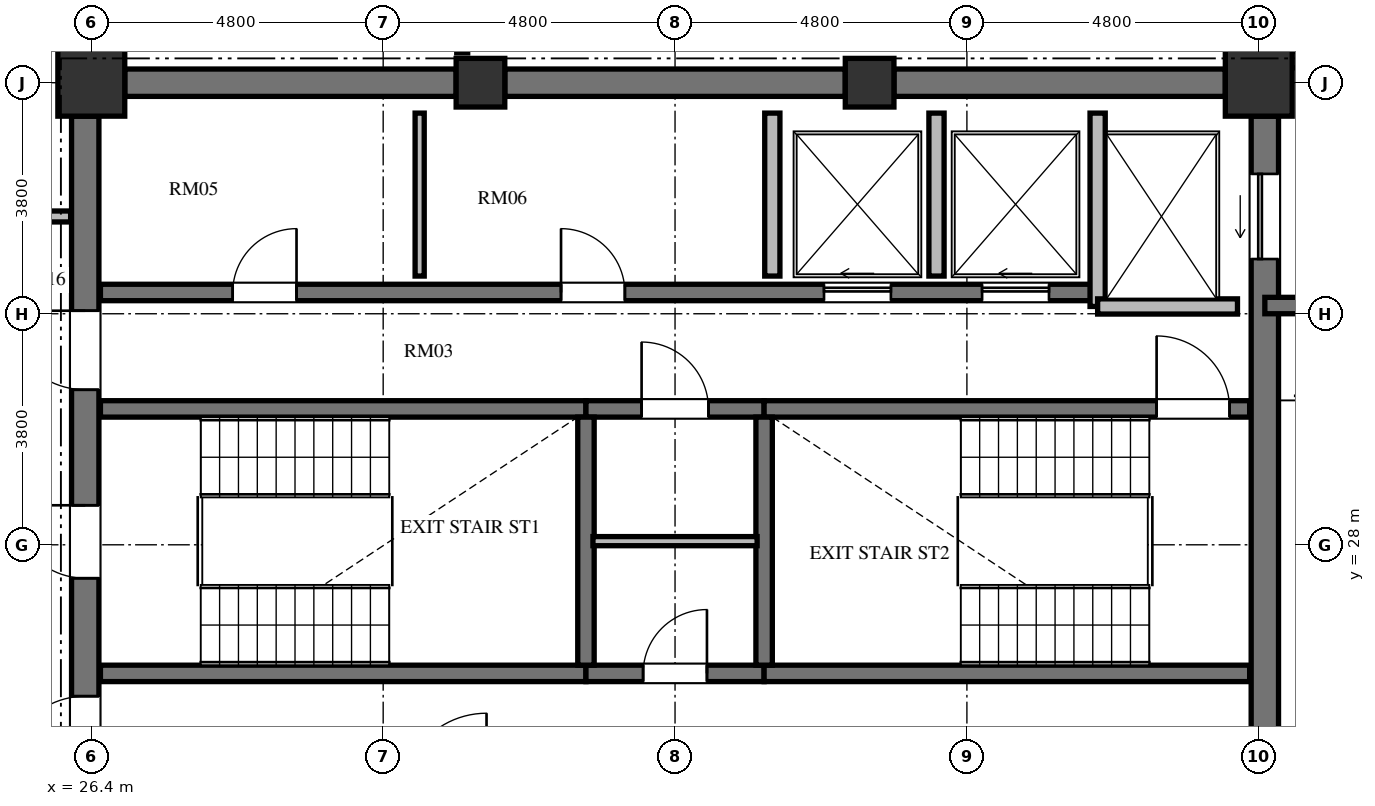
"""IFC4 building model, lengths in metres.
Left out: names, types, materials, properties, quantities, classifications, styles, units other than length and angle.
Written with IfcOpenShell. Run it as: python <this file> out.ifc"""

import sys

from ifc_helpers import new_model, si_unit, direction, frame, frame_2d, origin, origin_2d, place, context, subcontext, project, spatial, rectangle, extrude, element, fill, save


model = new_model("IFC4")
c1 = context("Model", 3, precision=1e-05, world=origin(), true_north=direction((0.0, 1.0)))
c2 = subcontext(c1, "Body", "Model", "MODEL_VIEW")
j1 = project(units=[si_unit("LENGTHUNIT", "METRE"), si_unit("PLANEANGLEUNIT", "RADIAN")], contexts=[c1])
p1 = place(None, origin())
s1 = spatial("IfcSite", under=j1, at=p1, CompositionType="ELEMENT")
p2 = place(p1, origin())
s2 = spatial("IfcBuilding", under=s1, at=p2, CompositionType="ELEMENT")
p3 = place(p2, frame((0.0, 0.0, 298.8)))
s3 = spatial("IfcBuildingStorey", under=s2, at=p3, CompositionType="ELEMENT", Elevation=298.8)
p4 = place(p3, frame((45.6, 35.6, 0.0), z_axis=(0.0, 0.0, 1.0), x_axis=(1.0, 0.0, 0.0)))
e1 = element("IfcColumn", 1, at=p4, inside=s3, PredefinedType="COLUMN", context=c2, shape_type="SweptSolid", body=[
    extrude(rectangle(XDim=1.1, YDim=1.1, at=origin_2d()), origin(), (0.0, 0.0, 1.0), 3.648),
])
for number, where, z_axis, x_axis in (
    (2, (39.2, 35.6, 0.0), (0.0, 0.0, 1.0), (1.0, 0.0, 0.0)),
    (3, (32.8, 35.6, 0.0), (0.0, 0.0, 1.0), (1.0, 0.0, 0.0)),
):
    element("IfcColumn", number, at=place(p3, frame(where, z_axis=z_axis, x_axis=x_axis)), inside=s3, PredefinedType="COLUMN", context=c2, shape_type="SweptSolid", body=[
        extrude(rectangle(XDim=0.8, YDim=0.8, at=origin_2d()), origin(), (0.0, 0.0, 1.0), 3.648),
    ])
p5 = place(p3, frame((26.4, 35.6, 0.0), z_axis=(0.0, 0.0, 1.0), x_axis=(1.0, 0.0, 0.0)))
e4 = element("IfcColumn", 4, at=p5, inside=s3, PredefinedType="COLUMN", context=c2, shape_type="SweptSolid", body=[
    extrude(rectangle(XDim=1.1, YDim=1.1, at=origin_2d()), origin(), (0.0, 0.0, 1.0), 3.648),
])
p6 = place(p3, frame((26.3, 20.95, 0.0), z_axis=(0.0, 0.0, 1.0), x_axis=(0.0, 1.0, 0.0)))
e5 = element("IfcWall", 5, at=p6, inside=s3, PredefinedType="SHEAR", context=c2, shape_type="SweptSolid", body=[
    extrude(rectangle(XDim=14.1, YDim=0.45, at=frame_2d((7.05, 0.0))), origin(), (0.0, 0.0, 1.0), 3.648),
])
p7 = place(p6, frame((6.5, 0.0, 0.0)))
e6 = element("IfcOpeningElement", 6, at=p7, cuts=e5, PredefinedType="OPENING", context=c2, shape_type="SweptSolid", body=[
    extrude(rectangle(XDim=1.2, YDim=2.15, at=frame_2d((0.6, 1.075))), frame((0.0, 0.235, 0.0), z_axis=(0.0, -1.0, 0.0), x_axis=(1.0, 0.0, 0.0)), (0.0, 0.0, 1.0), 0.47),
])
p8 = place(p6, frame((9.6, 0.0, 0.0)))
e7 = element("IfcOpeningElement", 7, at=p8, cuts=e5, PredefinedType="OPENING", context=c2, shape_type="SweptSolid", body=[
    extrude(rectangle(XDim=1.3, YDim=2.2, at=frame_2d((0.65, 1.1))), frame((0.0, 0.235, 0.0), z_axis=(0.0, -1.0, 0.0), x_axis=(1.0, 0.0, 0.0)), (0.0, 0.0, 1.0), 0.47),
])
p9 = place(p6, frame((3.26, 0.0, 0.0)))
e8 = element("IfcOpeningElement", 8, at=p9, cuts=e5, PredefinedType="OPENING", context=c2, shape_type="SweptSolid", body=[
    extrude(rectangle(XDim=1.3, YDim=2.2, at=frame_2d((0.65, 1.1))), frame((0.0, 0.235, 0.0), z_axis=(0.0, -1.0, 0.0), x_axis=(1.0, 0.0, 0.0)), (0.0, 0.0, 1.0), 0.47),
])
p10 = place(p3, frame((45.7, 20.95, 0.0), z_axis=(0.0, 0.0, 1.0), x_axis=(0.0, 1.0, 0.0)))
e9 = element("IfcWall", 9, at=p10, inside=s3, PredefinedType="SHEAR", context=c2, shape_type="SweptSolid", body=[
    extrude(rectangle(XDim=14.1, YDim=0.45, at=frame_2d((7.05, 0.0))), origin(), (0.0, 0.0, 1.0), 3.648),
])
p11 = place(p10, frame((11.75, 0.0, 0.0)))
e10 = element("IfcOpeningElement", 10, at=p11, cuts=e9, PredefinedType="OPENING", context=c2, shape_type="SweptSolid", body=[
    extrude(rectangle(XDim=1.4, YDim=2.3, at=frame_2d((0.7, 1.15))), frame((0.0, 0.235, 0.0), z_axis=(0.0, -1.0, 0.0), x_axis=(1.0, 0.0, 0.0)), (0.0, 0.0, 1.0), 0.47),
])
p12 = place(p10, frame((0.95, 0.0, 0.0)))
e11 = element("IfcOpeningElement", 11, at=p12, cuts=e9, PredefinedType="OPENING", context=c2, shape_type="SweptSolid", body=[
    extrude(rectangle(XDim=1.4, YDim=2.3, at=frame_2d((0.7, 1.15))), frame((0.0, 0.235, 0.0), z_axis=(0.0, -1.0, 0.0), x_axis=(1.0, 0.0, 0.0)), (0.0, 0.0, 1.0), 0.47),
])
p13 = place(p3, frame((26.95, 35.6, 0.0), z_axis=(0.0, 0.0, 1.0), x_axis=(1.0, 0.0, 0.0)))
e12 = element("IfcWall", 12, at=p13, inside=s3, PredefinedType="SHEAR", context=c2, shape_type="SweptSolid", body=[
    extrude(rectangle(XDim=5.45, YDim=0.45, at=frame_2d((2.725, 0.0))), origin(), (0.0, 0.0, 1.0), 3.648),
])
p14 = place(p3, frame((33.2, 35.6, 0.0), z_axis=(0.0, 0.0, 1.0), x_axis=(1.0, 0.0, 0.0)))
e13 = element("IfcWall", 13, at=p14, inside=s3, PredefinedType="SHEAR", context=c2, shape_type="SweptSolid", body=[
    extrude(rectangle(XDim=5.6, YDim=0.45, at=frame_2d((2.8, 0.0))), origin(), (0.0, 0.0, 1.0), 3.648),
])
p15 = place(p3, frame((39.6, 35.6, 0.0), z_axis=(0.0, 0.0, 1.0), x_axis=(1.0, 0.0, 0.0)))
e14 = element("IfcWall", 14, at=p15, inside=s3, PredefinedType="SHEAR", context=c2, shape_type="SweptSolid", body=[
    extrude(rectangle(XDim=5.45, YDim=0.45, at=frame_2d((2.725, 0.0))), origin(), (0.0, 0.0, 1.0), 3.648),
])
p16 = place(p3, frame((27.595, 38.808, 0.0), z_axis=(0.0, 0.0, 1.0), x_axis=(-0.728251519923, -0.685309947199, 0.0)))
e15 = element("IfcWall", 15, at=p16, inside=s3, PredefinedType="SOLIDWALL", context=c2, shape_type="SweptSolid", body=[
    extrude(rectangle(XDim=5.981, YDim=0.28, at=frame_2d((2.99, 0.0))), origin(), (0.0, 0.0, 1.0), 3.328),
])
p17 = place(p16, frame((2.391, 0.0, 0.85)))
e16 = element("IfcOpeningElement", 16, at=p17, cuts=e15, PredefinedType="OPENING", context=c2, shape_type="SweptSolid", body=[
    extrude(rectangle(XDim=1.2, YDim=1.8, at=frame_2d((0.6, 0.9))), frame((0.0, 0.15, 0.0), z_axis=(0.0, -1.0, 0.0), x_axis=(1.0, 0.0, 0.0)), (0.0, 0.0, 1.0), 0.3),
])
p18 = place(p3, frame((26.55, 30.235, 0.0), z_axis=(0.0, 0.0, 1.0), x_axis=(1.0, 0.0, 0.0)))
e17 = element("IfcWall", 17, at=p18, inside=s3, PredefinedType="SHEAR", context=c2, shape_type="SweptSolid", body=[
    extrude(rectangle(XDim=7.985, YDim=0.27, at=frame_2d((3.992, 0.0))), origin(), (0.0, 0.0, 1.0), 3.648),
])
p19 = place(p3, frame((34.535, 30.235, 0.0), z_axis=(0.0, 0.0, 1.0), x_axis=(1.0, 0.0, 0.0)))
e18 = element("IfcWall", 18, at=p19, inside=s3, PredefinedType="SHEAR", context=c2, shape_type="SweptSolid", body=[
    extrude(rectangle(XDim=2.93, YDim=0.27, at=frame_2d((1.465, 0.0))), origin(), (0.0, 0.0, 1.0), 3.648),
])
p20 = place(p19, frame((0.915, 0.0, 0.0)))
e19 = element("IfcOpeningElement", 19, at=p20, cuts=e18, PredefinedType="OPENING", context=c2, shape_type="SweptSolid", body=[
    extrude(rectangle(XDim=1.1, YDim=2.15, at=frame_2d((0.55, 1.075))), frame((0.0, 0.145, 0.0), z_axis=(0.0, -1.0, 0.0), x_axis=(1.0, 0.0, 0.0)), (0.0, 0.0, 1.0), 0.29),
])
p21 = place(p3, frame((37.465, 30.235, 0.0), z_axis=(0.0, 0.0, 1.0), x_axis=(1.0, 0.0, 0.0)))
e20 = element("IfcWall", 20, at=p21, inside=s3, PredefinedType="SHEAR", context=c2, shape_type="SweptSolid", body=[
    extrude(rectangle(XDim=7.985, YDim=0.27, at=frame_2d((3.992, 0.0))), origin(), (0.0, 0.0, 1.0), 3.648),
])
p22 = place(p21, frame((6.455, 0.0, 0.0)))
e21 = element("IfcOpeningElement", 21, at=p22, cuts=e20, PredefinedType="OPENING", context=c2, shape_type="SweptSolid", body=[
    extrude(rectangle(XDim=1.2, YDim=2.15, at=frame_2d((0.6, 1.075))), frame((0.0, 0.145, 0.0), z_axis=(0.0, -1.0, 0.0), x_axis=(1.0, 0.0, 0.0)), (0.0, 0.0, 1.0), 0.29),
])
p23 = place(p3, frame((26.55, 25.885, 0.0), z_axis=(0.0, 0.0, 1.0), x_axis=(1.0, 0.0, 0.0)))
e22 = element("IfcWall", 22, at=p23, inside=s3, PredefinedType="SHEAR", context=c2, shape_type="SweptSolid", body=[
    extrude(rectangle(XDim=7.985, YDim=0.27, at=frame_2d((3.992, 0.0))), origin(), (0.0, 0.0, 1.0), 3.648),
])
p24 = place(p3, frame((34.535, 25.885, 0.0), z_axis=(0.0, 0.0, 1.0), x_axis=(1.0, 0.0, 0.0)))
e23 = element("IfcWall", 23, at=p24, inside=s3, PredefinedType="SHEAR", context=c2, shape_type="SweptSolid", body=[
    extrude(rectangle(XDim=2.93, YDim=0.27, at=frame_2d((1.465, 0.0))), origin(), (0.0, 0.0, 1.0), 3.648),
])
p25 = place(p24, frame((0.94, 0.0, 0.0)))
e24 = element("IfcOpeningElement", 24, at=p25, cuts=e23, PredefinedType="OPENING", context=c2, shape_type="SweptSolid", body=[
    extrude(rectangle(XDim=1.05, YDim=2.15, at=frame_2d((0.525, 1.075))), frame((0.0, 0.145, 0.0), z_axis=(0.0, -1.0, 0.0), x_axis=(1.0, 0.0, 0.0)), (0.0, 0.0, 1.0), 0.29),
])
p26 = place(p3, frame((37.465, 25.885, 0.0), z_axis=(0.0, 0.0, 1.0), x_axis=(1.0, 0.0, 0.0)))
e25 = element("IfcWall", 25, at=p26, inside=s3, PredefinedType="SHEAR", context=c2, shape_type="SweptSolid", body=[
    extrude(rectangle(XDim=7.985, YDim=0.27, at=frame_2d((3.992, 0.0))), origin(), (0.0, 0.0, 1.0), 3.648),
])
for number, where, z_axis, x_axis in (
    (26, (34.535, 26.02, 0.0), (0.0, 0.0, 1.0), (0.0, 1.0, 0.0)),
    (27, (37.465, 26.02, 0.0), (0.0, 0.0, 1.0), (0.0, 1.0, 0.0)),
):
    element("IfcWall", number, at=place(p3, frame(where, z_axis=z_axis, x_axis=x_axis)), inside=s3, PredefinedType="SHEAR", context=c2, shape_type="SweptSolid", body=[
        extrude(rectangle(XDim=4.08, YDim=0.27, at=frame_2d((2.04, 0.0))), origin(), (0.0, 0.0, 1.0), 3.648),
    ])
p27 = place(p3, frame((34.65, 28.06, 0.0), z_axis=(0.0, 0.0, 1.0), x_axis=(1.0, 0.0, 0.0)))
e28 = element("IfcWall", 28, at=p27, inside=s3, PredefinedType="PARTITIONING", context=c2, shape_type="SweptSolid", body=[
    extrude(rectangle(XDim=2.7, YDim=0.15, at=frame_2d((1.35, 0.0))), origin(), (0.0, 0.0, 1.0), 3.328),
])
p28 = place(p3, frame((26.55, 32.15, 0.0), z_axis=(0.0, 0.0, 1.0), x_axis=(1.0, 0.0, 0.0)))
e29 = element("IfcWall", 29, at=p28, inside=s3, PredefinedType="SHEAR", context=c2, shape_type="SweptSolid", body=[
    extrude(rectangle(XDim=16.4, YDim=0.27, at=frame_2d((8.2, 0.0))), origin(), (0.0, 0.0, 1.0), 3.648),
])
p29 = place(p28, frame((2.175, 0.0, 0.0)))
e30 = element("IfcOpeningElement", 30, at=p29, cuts=e29, PredefinedType="OPENING", context=c2, shape_type="SweptSolid", body=[
    extrude(rectangle(XDim=1.05, YDim=2.15, at=frame_2d((0.525, 1.075))), frame((0.0, 0.145, 0.0), z_axis=(0.0, -1.0, 0.0), x_axis=(1.0, 0.0, 0.0)), (0.0, 0.0, 1.0), 0.29),
])
p30 = place(p28, frame((7.575, 0.0, 0.0)))
e31 = element("IfcOpeningElement", 31, at=p30, cuts=e29, PredefinedType="OPENING", context=c2, shape_type="SweptSolid", body=[
    extrude(rectangle(XDim=1.05, YDim=2.15, at=frame_2d((0.525, 1.075))), frame((0.0, 0.145, 0.0), z_axis=(0.0, -1.0, 0.0), x_axis=(1.0, 0.0, 0.0)), (0.0, 0.0, 1.0), 0.29),
])
p31 = place(p28, frame((11.9, 0.0, 0.0)))
e32 = element("IfcOpeningElement", 32, at=p31, cuts=e29, PredefinedType="OPENING", context=c2, shape_type="SweptSolid", body=[
    extrude(rectangle(XDim=1.1, YDim=2.2, at=frame_2d((0.55, 1.1))), frame((0.0, 0.145, 0.0), z_axis=(0.0, -1.0, 0.0), x_axis=(1.0, 0.0, 0.0)), (0.0, 0.0, 1.0), 0.29),
])
p32 = place(p28, frame((14.5, 0.0, 0.0)))
e33 = element("IfcOpeningElement", 33, at=p32, cuts=e29, PredefinedType="OPENING", context=c2, shape_type="SweptSolid", body=[
    extrude(rectangle(XDim=1.1, YDim=2.2, at=frame_2d((0.55, 1.1))), frame((0.0, 0.145, 0.0), z_axis=(0.0, -1.0, 0.0), x_axis=(1.0, 0.0, 0.0)), (0.0, 0.0, 1.0), 0.29),
])
p33 = place(p3, frame((42.95, 31.92, 0.0), z_axis=(0.0, 0.0, 1.0), x_axis=(0.0, 1.0, 0.0)))
e34 = element("IfcWall", 34, at=p33, inside=s3, PredefinedType="SOLIDWALL", context=c2, shape_type="SweptSolid", body=[
    extrude(rectangle(XDim=3.18, YDim=0.25, at=frame_2d((1.59, 0.0))), origin(), (0.0, 0.0, 1.0), 3.328),
])
p34 = place(p3, frame((42.95, 31.92, 0.0), z_axis=(0.0, 0.0, 1.0), x_axis=(1.0, 0.0, 0.0)))
e35 = element("IfcWall", 35, at=p34, inside=s3, PredefinedType="SOLIDWALL", context=c2, shape_type="SweptSolid", body=[
    extrude(rectangle(XDim=2.3, YDim=0.25, at=frame_2d((1.15, 0.0))), origin(), (0.0, 0.0, 1.0), 3.328),
])
for number, where, z_axis, x_axis in (
    (36, (37.6, 32.42, 0.0), (0.0, 0.0, 1.0), (0.0, 1.0, 0.0)),
    (37, (40.3, 32.42, 0.0), (0.0, 0.0, 1.0), (0.0, 1.0, 0.0)),
):
    element("IfcWall", number, at=place(p3, frame(where, z_axis=z_axis, x_axis=x_axis)), inside=s3, PredefinedType="SOLIDWALL", context=c2, shape_type="SweptSolid", body=[
        extrude(rectangle(XDim=2.68, YDim=0.25, at=frame_2d((1.34, 0.0))), origin(), (0.0, 0.0, 1.0), 3.328),
    ])
p35 = place(p3, frame((31.8, 32.42, 0.0), z_axis=(0.0, 0.0, 1.0), x_axis=(0.0, 1.0, 0.0)))
e38 = element("IfcWall", 38, at=p35, inside=s3, PredefinedType="PARTITIONING", context=c2, shape_type="SweptSolid", body=[
    extrude(rectangle(XDim=2.68, YDim=0.15, at=frame_2d((1.34, 0.0))), origin(), (0.0, 0.0, 1.0), 3.328),
])
p36 = place(p3, frame((45.925, 35.98, 0.0), z_axis=(0.0, 0.0, 1.0), x_axis=(1.0, 0.0, 0.0)))
e39 = element("IfcWall", 39, at=p36, inside=s3, PredefinedType="SHEAR", context=c2, shape_type="SweptSolid", body=[
    extrude(rectangle(XDim=4.625, YDim=0.27, at=frame_2d((2.312, 0.0))), origin(), (0.0, 0.0, 1.0), 3.648),
])
p37 = place(p3, frame((45.7, 31.935, 0.0), z_axis=(0.0, 0.0, 1.0), x_axis=(1.0, 0.0, 0.0)))
e40 = element("IfcWall", 40, at=p37, inside=s3, PredefinedType="SHEAR", context=c2, shape_type="SweptSolid", body=[
    extrude(rectangle(XDim=4.715, YDim=0.27, at=frame_2d((2.357, 0.0))), origin(), (0.0, 0.0, 1.0), 3.648),
])
p38 = place(p3, frame((32.5, 36.09, 0.0), z_axis=(0.0, 0.0, 1.0), x_axis=(0.0, 1.0, 0.0)))
e41 = element("IfcWall", 41, at=p38, inside=s3, PredefinedType="PARTITIONING", context=c2, shape_type="SweptSolid", body=[
    extrude(rectangle(XDim=2.35, YDim=0.18, at=frame_2d((1.175, 0.0))), origin(), (0.0, 0.0, 1.0), 3.328),
])
p39 = place(p3, frame((23.71, 33.4, 0.0), z_axis=(0.0, 0.0, 1.0), x_axis=(1.0, 0.0, 0.0)))
e42 = element("IfcWall", 42, at=p39, inside=s3, PredefinedType="PARTITIONING", context=c2, shape_type="SweptSolid", body=[
    extrude(rectangle(XDim=2.35, YDim=0.18, at=frame_2d((1.175, 0.0))), origin(), (0.0, 0.0, 1.0), 3.328),
])
p40 = place(p7, origin())
e43 = element("IfcDoor", 43, at=p40, inside=s3, OperationType="SINGLE_SWING_RIGHT", PredefinedType="DOOR", context=c2, shape_type="SweptSolid", body=[
    extrude(rectangle(XDim=1.2, YDim=2.15, at=frame_2d((0.6, 1.075))), frame((0.0, 0.025, 0.0), z_axis=(0.0, -1.0, 0.0), x_axis=(1.0, 0.0, 0.0)), (0.0, 0.0, 1.0), 0.05),
])
fill(e6, e43)
p41 = place(p22, origin())
e44 = element("IfcDoor", 44, at=p41, inside=s3, OperationType="SINGLE_SWING_LEFT", PredefinedType="DOOR", context=c2, shape_type="SweptSolid", body=[
    extrude(rectangle(XDim=1.2, YDim=2.15, at=frame_2d((0.6, 1.075))), frame((0.0, 0.025, 0.0), z_axis=(0.0, -1.0, 0.0), x_axis=(1.0, 0.0, 0.0)), (0.0, 0.0, 1.0), 0.05),
])
fill(e21, e44)
p42 = place(p25, origin())
e45 = element("IfcDoor", 45, at=p42, inside=s3, OperationType="SINGLE_SWING_RIGHT", PredefinedType="DOOR", context=c2, shape_type="SweptSolid", body=[
    extrude(rectangle(XDim=1.05, YDim=2.15, at=frame_2d((0.525, 1.075))), frame((0.0, 0.025, 0.0), z_axis=(0.0, -1.0, 0.0), x_axis=(1.0, 0.0, 0.0)), (0.0, 0.0, 1.0), 0.05),
])
fill(e24, e45)
p43 = place(p20, origin())
e46 = element("IfcDoor", 46, at=p43, inside=s3, OperationType="SINGLE_SWING_LEFT", PredefinedType="DOOR", context=c2, shape_type="SweptSolid", body=[
    extrude(rectangle(XDim=1.1, YDim=2.15, at=frame_2d((0.55, 1.075))), frame((0.0, 0.025, 0.0), z_axis=(0.0, -1.0, 0.0), x_axis=(1.0, 0.0, 0.0)), (0.0, 0.0, 1.0), 0.05),
])
fill(e19, e46)
p44 = place(p8, origin())
e47 = element("IfcDoor", 47, at=p44, inside=s3, OperationType="SINGLE_SWING_RIGHT", PredefinedType="DOOR", context=c2, shape_type="SweptSolid", body=[
    extrude(rectangle(XDim=1.3, YDim=2.2, at=frame_2d((0.65, 1.1))), frame((0.0, 0.025, 0.0), z_axis=(0.0, -1.0, 0.0), x_axis=(1.0, 0.0, 0.0)), (0.0, 0.0, 1.0), 0.05),
])
fill(e7, e47)
p45 = place(p9, origin())
e48 = element("IfcDoor", 48, at=p45, inside=s3, OperationType="SINGLE_SWING_LEFT", PredefinedType="DOOR", context=c2, shape_type="SweptSolid", body=[
    extrude(rectangle(XDim=1.3, YDim=2.2, at=frame_2d((0.65, 1.1))), frame((0.0, 0.025, 0.0), z_axis=(0.0, -1.0, 0.0), x_axis=(1.0, 0.0, 0.0)), (0.0, 0.0, 1.0), 0.05),
])
fill(e8, e48)
p46 = place(p29, origin())
e49 = element("IfcDoor", 49, at=p46, inside=s3, OperationType="SINGLE_SWING_RIGHT", PredefinedType="DOOR", context=c2, shape_type="SweptSolid", body=[
    extrude(rectangle(XDim=1.05, YDim=2.15, at=frame_2d((0.525, 1.075))), frame((0.0, 0.025, 0.0), z_axis=(0.0, -1.0, 0.0), x_axis=(1.0, 0.0, 0.0)), (0.0, 0.0, 1.0), 0.05),
])
fill(e30, e49)
p47 = place(p30, origin())
e50 = element("IfcDoor", 50, at=p47, inside=s3, OperationType="SINGLE_SWING_LEFT", PredefinedType="DOOR", context=c2, shape_type="SweptSolid", body=[
    extrude(rectangle(XDim=1.05, YDim=2.15, at=frame_2d((0.525, 1.075))), frame((0.0, 0.025, 0.0), z_axis=(0.0, -1.0, 0.0), x_axis=(1.0, 0.0, 0.0)), (0.0, 0.0, 1.0), 0.05),
])
fill(e31, e50)
p48 = place(p31, origin())
e51 = element("IfcDoor", 51, at=p48, inside=s3, OperationType="SLIDING_TO_LEFT", PredefinedType="DOOR", context=c2, shape_type="SweptSolid", body=[
    extrude(rectangle(XDim=1.1, YDim=2.2, at=frame_2d((0.55, 1.1))), frame((0.0, 0.025, 0.0), z_axis=(0.0, -1.0, 0.0), x_axis=(1.0, 0.0, 0.0)), (0.0, 0.0, 1.0), 0.05),
])
fill(e32, e51)
p49 = place(p32, origin())
e52 = element("IfcDoor", 52, at=p49, inside=s3, OperationType="SLIDING_TO_LEFT", PredefinedType="DOOR", context=c2, shape_type="SweptSolid", body=[
    extrude(rectangle(XDim=1.1, YDim=2.2, at=frame_2d((0.55, 1.1))), frame((0.0, 0.025, 0.0), z_axis=(0.0, -1.0, 0.0), x_axis=(1.0, 0.0, 0.0)), (0.0, 0.0, 1.0), 0.05),
])
fill(e33, e52)
p50 = place(p11, origin())
e53 = element("IfcDoor", 53, at=p50, inside=s3, OperationType="SLIDING_TO_LEFT", PredefinedType="DOOR", context=c2, shape_type="SweptSolid", body=[
    extrude(rectangle(XDim=1.4, YDim=2.3, at=frame_2d((0.7, 1.15))), frame((0.0, 0.025, 0.0), z_axis=(0.0, -1.0, 0.0), x_axis=(1.0, 0.0, 0.0)), (0.0, 0.0, 1.0), 0.05),
])
fill(e10, e53)
save(model, sys.argv[1])
